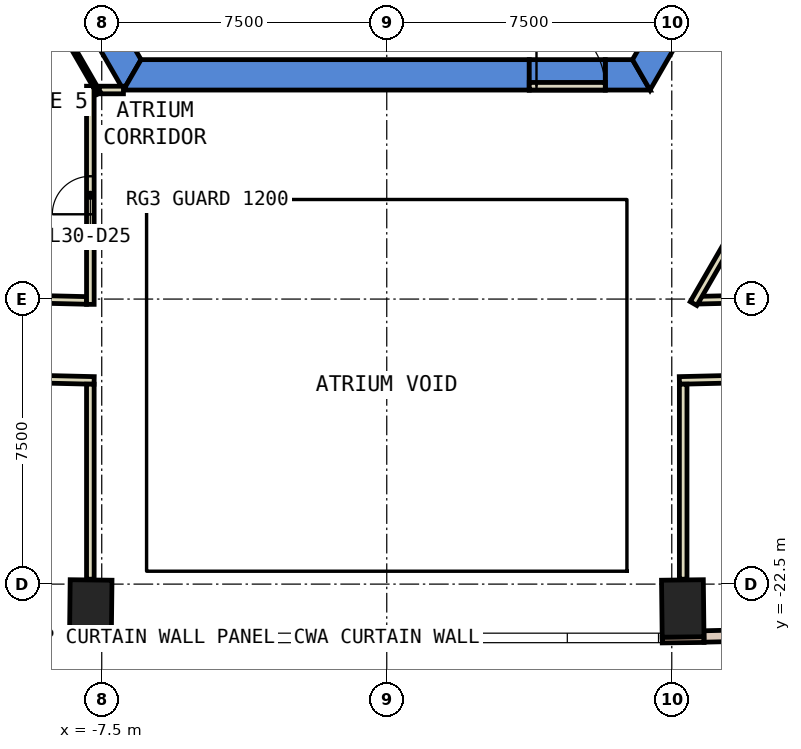
"""IFC4 building model, lengths in metres.
Left out: names, types, materials, properties, quantities, classifications, styles, units other than length and angle.
Written with IfcOpenShell. Run it as: python <this file> out.ifc"""

import sys

from ifc_helpers import new_model, si_unit, direction, frame, frame_2d, origin, origin_2d, place, context, subcontext, project, spatial, polyline, rectangle, outline, extrude, element, fill, save


model = new_model("IFC4")
c1 = context("Model", 3, precision=1e-05, world=origin(), true_north=direction((0.0, 1.0)))
c2 = subcontext(c1, "Body", "Model", "MODEL_VIEW")
j1 = project(units=[si_unit("LENGTHUNIT", "METRE"), si_unit("PLANEANGLEUNIT", "RADIAN")], contexts=[c1])
p1 = place(None, origin())
s1 = spatial("IfcSite", under=j1, at=p1, CompositionType="ELEMENT")
p2 = place(p1, origin())
s2 = spatial("IfcBuilding", under=s1, at=p2, CompositionType="ELEMENT")
p3 = place(p2, frame((0.0, 0.0, 138.2)))
s3 = spatial("IfcBuildingStorey", under=s2, at=p3, CompositionType="ELEMENT", Elevation=138.2)
for number, where, z_axis, x_axis in (
    (1, (-7.789, -23.141, 0.0), (0.0, 0.0, 1.0), (-1.0, 0.012, 0.0)),
    (2, (7.789, -23.141, 0.0), (0.0, 0.0, 1.0), (1.0, 0.012, 0.0)),
):
    element("IfcColumn", number, at=place(p3, frame(where, z_axis=z_axis, x_axis=x_axis)), inside=s3, PredefinedType="COLUMN", context=c2, shape_type="SweptSolid", body=[
        extrude(rectangle(XDim=1.1, YDim=1.5, at=origin_2d()), origin(), (0.0, 0.0, 1.0), 3.8),
    ])
p4 = place(p3, frame((0.0, 0.0, -0.6)))
e3 = element("IfcWall", 3, at=p4, inside=s3, PredefinedType="SHEAR", context=c2, shape_type="SweptSolid", body=[
    extrude(outline(polyline([(-13.856, 2.5), (-6.928, -9.5), (-6.466, -8.7), (-12.933, 2.5), (-13.856, 2.5)])), origin(), (0.0, 0.0, 1.0), 4.4),
])
p5 = place(p3, frame((0.0, 0.0, -0.6)))
e4 = element("IfcWall", 4, at=p5, inside=s3, PredefinedType="SHEAR", context=c2, shape_type="SweptSolid", body=[
    extrude(outline(polyline([(3.75, -9.5), (3.75, -8.7), (-6.466, -8.7), (-6.928, -9.5), (3.75, -9.5)])), origin(), (0.0, 0.0, 1.0), 4.4),
])
p6 = place(p3, frame((0.0, 0.0, -0.6)))
e5 = element("IfcWall", 5, at=p6, inside=s3, PredefinedType="SHEAR", context=c2, shape_type="SweptSolid", body=[
    extrude(outline(polyline([(5.75, -8.7), (5.75, -9.5), (6.928, -9.5), (6.466, -8.7), (5.75, -8.7)])), origin(), (0.0, 0.0, 1.0), 4.4),
])
p7 = place(p3, frame((0.0, 0.0, 3.6)))
e6 = element("IfcWall", 6, at=p7, inside=s3, PredefinedType="SHEAR", context=c2, shape_type="SweptSolid", body=[
    extrude(outline(polyline([(5.75, -9.5), (5.75, -8.7), (3.75, -8.7), (3.75, -9.5), (5.75, -9.5)])), origin(), (0.0, 0.0, 1.0), 0.2),
])
p8 = place(p3, frame((0.0, 0.0, -0.6)))
e7 = element("IfcWall", 7, at=p8, inside=s3, PredefinedType="SHEAR", context=c2, shape_type="SweptSolid", body=[
    extrude(outline(polyline([(8.117, -7.44), (7.424, -7.04), (6.466, -8.7), (6.928, -9.5), (8.117, -7.44)])), origin(), (0.0, 0.0, 1.0), 4.4),
])
for number, where, z_axis, x_axis in (
    (8, (-8.349, -23.96, 0.0), (0.0, 0.0, 1.0), (1.0, -0.011, 0.0)),
    (9, (7.249, -23.972, 0.0), (0.0, 0.0, 1.0), (1.0, 0.011, 0.0)),
):
    element("IfcWall", number, at=place(p3, frame(where, z_axis=z_axis, x_axis=x_axis)), inside=s3, PredefinedType="STANDARD", context=c2, shape_type="SweptSolid", body=[
        extrude(rectangle(XDim=1.1, YDim=0.15, at=frame_2d((0.55, 0.0))), origin(), (0.0, 0.0, 1.0), 3.8),
    ])
p9 = place(p3, frame((-15.68, -23.705, 0.0), z_axis=(0.0, 0.0, 1.0), x_axis=(0.999722302867, -0.023565168146, 0.0)))
e10 = element("IfcWall", 10, at=p9, inside=s3, PredefinedType="STANDARD", context=c2, shape_type="SweptSolid", body=[
    extrude(rectangle(XDim=7.335, YDim=0.3, at=frame_2d((3.667, 0.0))), origin(), (0.0, 0.0, 1.0), 3.8),
])
p10 = place(p9, frame((0.834, 0.0, 0.0)))
e11 = element("IfcOpeningElement", 11, at=p10, cuts=e10, PredefinedType="OPENING", context=c2, shape_type="SweptSolid", body=[
    extrude(rectangle(XDim=2.0, YDim=2.4, at=frame_2d((1.0, 1.2))), frame((0.0, 0.16, 0.0), z_axis=(0.0, -1.0, 0.0), x_axis=(1.0, 0.0, 0.0)), (0.0, 0.0, 1.0), 0.32),
])
p11 = place(p9, frame((4.301, 0.0, 0.9)))
e12 = element("IfcOpeningElement", 12, at=p11, cuts=e10, PredefinedType="OPENING", context=c2, shape_type="SweptSolid", body=[
    extrude(rectangle(XDim=2.4, YDim=2.6, at=frame_2d((1.2, 1.3))), frame((0.0, 0.16, 0.0), z_axis=(0.0, -1.0, 0.0), x_axis=(1.0, 0.0, 0.0)), (0.0, 0.0, 1.0), 0.32),
])
p12 = place(p3, frame((8.347, -23.878, 0.0), z_axis=(0.0, 0.0, 1.0), x_axis=(0.999722302867, 0.023565168146, 0.0)))
e13 = element("IfcWall", 13, at=p12, inside=s3, PredefinedType="STANDARD", context=c2, shape_type="SweptSolid", body=[
    extrude(rectangle(XDim=7.335, YDim=0.3, at=frame_2d((3.667, 0.0))), origin(), (0.0, 0.0, 1.0), 3.8),
])
p13 = place(p12, frame((0.634, 0.0, 0.9)))
e14 = element("IfcOpeningElement", 14, at=p13, cuts=e13, PredefinedType="OPENING", context=c2, shape_type="SweptSolid", body=[
    extrude(rectangle(XDim=2.4, YDim=2.6, at=frame_2d((1.2, 1.3))), frame((0.0, 0.16, 0.0), z_axis=(0.0, -1.0, 0.0), x_axis=(1.0, 0.0, 0.0)), (0.0, 0.0, 1.0), 0.32),
])
p14 = place(p12, frame((4.301, 0.0, 0.9)))
e15 = element("IfcOpeningElement", 15, at=p14, cuts=e13, PredefinedType="OPENING", context=c2, shape_type="SweptSolid", body=[
    extrude(rectangle(XDim=2.4, YDim=2.6, at=frame_2d((1.2, 1.3))), frame((0.0, 0.16, 0.0), z_axis=(0.0, -1.0, 0.0), x_axis=(1.0, 0.0, 0.0)), (0.0, 0.0, 1.0), 0.32),
])
p15 = place(p3, frame((8.223, -15.029, 0.0), z_axis=(0.0, 0.0, 1.0), x_axis=(0.99971920994, 0.023696018186, 0.0)))
e16 = element("IfcWall", 16, at=p15, inside=s3, PredefinedType="PARTITIONING", context=c2, shape_type="SweptSolid", body=[
    extrude(rectangle(XDim=7.727, YDim=0.2, at=frame_2d((3.864, 0.0))), origin(), (0.0, 0.0, 1.0), 3.8),
])
p16 = place(p3, frame((-10.155, -14.983, 0.0), z_axis=(0.0, 0.0, 1.0), x_axis=(0.999724165956, -0.023485995887, 0.0)))
e17 = element("IfcWall", 17, at=p16, inside=s3, PredefinedType="PARTITIONING", context=c2, shape_type="SweptSolid", body=[
    extrude(rectangle(XDim=2.256, YDim=0.2, at=frame_2d((1.128, 0.0))), origin(), (0.0, 0.0, 1.0), 3.8),
])
p17 = place(p3, frame((16.09, -16.943, 0.0), z_axis=(0.0, 0.0, 1.0), x_axis=(-0.999721662071, -0.023592337425, 0.0)))
e18 = element("IfcWall", 18, at=p17, inside=s3, PredefinedType="PARTITIONING", context=c2, shape_type="SweptSolid", body=[
    extrude(rectangle(XDim=8.393, YDim=0.2, at=frame_2d((4.196, 0.0))), origin(), (0.0, 0.0, 1.0), 3.8),
])
p18 = place(p17, frame((3.696, 0.0, 0.0)))
e19 = element("IfcOpeningElement", 19, at=p18, cuts=e18, PredefinedType="OPENING", context=c2, shape_type="SweptSolid", body=[
    extrude(rectangle(XDim=1.0, YDim=2.1, at=frame_2d((0.5, 1.05))), frame((0.0, 0.11, 0.0), z_axis=(0.0, -1.0, 0.0), x_axis=(1.0, 0.0, 0.0)), (0.0, 0.0, 1.0), 0.22),
])
p19 = place(p3, frame((-7.7, -17.141, 0.0), z_axis=(0.0, 0.0, 1.0), x_axis=(-0.999722699727, 0.023548325865, 0.0)))
e20 = element("IfcWall", 20, at=p19, inside=s3, PredefinedType="PARTITIONING", context=c2, shape_type="SweptSolid", body=[
    extrude(rectangle(XDim=8.242, YDim=0.2, at=frame_2d((4.121, 0.0))), origin(), (0.0, 0.0, 1.0), 3.8),
])
p20 = place(p19, frame((3.696, 0.0, 0.0)))
e21 = element("IfcOpeningElement", 21, at=p20, cuts=e20, PredefinedType="OPENING", context=c2, shape_type="SweptSolid", body=[
    extrude(rectangle(XDim=1.0, YDim=2.1, at=frame_2d((0.5, 1.05))), frame((0.0, 0.11, 0.0), z_axis=(0.0, -1.0, 0.0), x_axis=(1.0, 0.0, 0.0)), (0.0, 0.0, 1.0), 0.22),
])
p21 = place(p3, frame((-7.572, -9.499, 0.0), z_axis=(0.0, 0.0, 1.0), x_axis=(1.0, 0.0, 0.0)))
e22 = element("IfcWall", 22, at=p21, inside=s3, PredefinedType="PARTITIONING", context=c2, shape_type="SweptSolid", body=[
    extrude(rectangle(XDim=0.643, YDim=0.2, at=frame_2d((0.322, 0.0))), origin(), (0.0, 0.0, 1.0), 3.8),
])
p22 = place(p3, frame((-7.8, -15.139, 0.0), z_axis=(0.0, 0.0, 1.0), x_axis=(0.0, 1.0, 0.0)))
e23 = element("IfcWall", 23, at=p22, inside=s3, PredefinedType="PARTITIONING", context=c2, shape_type="SweptSolid", body=[
    extrude(rectangle(XDim=5.74, YDim=0.2, at=frame_2d((2.87, 0.0))), origin(), (0.0, 0.0, 1.0), 3.8),
])
p23 = place(p22, frame((2.37, 0.0, 0.0)))
e24 = element("IfcOpeningElement", 24, at=p23, cuts=e23, PredefinedType="OPENING", context=c2, shape_type="SweptSolid", body=[
    extrude(rectangle(XDim=1.0, YDim=2.1, at=frame_2d((0.5, 1.05))), frame((0.0, 0.11, 0.0), z_axis=(0.0, -1.0, 0.0), x_axis=(1.0, 0.0, 0.0)), (0.0, 0.0, 1.0), 0.22),
])
for number, where, z_axis, x_axis in (
    (25, (7.8, -17.239, 0.0), (0.0, 0.0, 1.0), (0.0, -1.0, 0.0)),
    (26, (-7.8, -22.371, 0.0), (0.0, 0.0, 1.0), (0.0, 1.0, 0.0)),
):
    element("IfcWall", number, at=place(p3, frame(where, z_axis=z_axis, x_axis=x_axis)), inside=s3, PredefinedType="PARTITIONING", context=c2, shape_type="SweptSolid", body=[
        extrude(rectangle(XDim=5.132, YDim=0.2, at=frame_2d((2.566, 0.0))), origin(), (0.0, 0.0, 1.0), 3.8),
    ])
p24 = place(p3, frame((-7.572, -9.586, 0.0), z_axis=(0.0, 0.0, 1.0), x_axis=(-0.500037407586, 0.866003805427, 0.0)))
e27 = element("IfcWall", 27, at=p24, inside=s3, PredefinedType="PARTITIONING", context=c2, shape_type="SweptSolid", body=[
    extrude(rectangle(XDim=4.115, YDim=0.1, at=frame_2d((2.058, 0.0))), origin(), (0.0, 0.0, 1.0), 3.8),
])
p25 = place(p3, frame((3.75, -9.4, 0.0), z_axis=(0.0, 0.0, 1.0), x_axis=(1.0, 0.0, 0.0)))
e28 = element("IfcWall", 28, at=p25, inside=s3, PredefinedType="PARTITIONING", context=c2, shape_type="SweptSolid", body=[
    extrude(rectangle(XDim=2.0, YDim=0.2, at=frame_2d((1.0, 0.0))), origin(), (0.0, 0.0, 1.0), 2.4),
])
p26 = place(p25, frame((0.19, 0.0, 0.0)))
e29 = element("IfcOpeningElement", 29, at=p26, cuts=e28, PredefinedType="OPENING", context=c2, shape_type="SweptSolid", body=[
    extrude(rectangle(XDim=1.8, YDim=2.1, at=frame_2d((0.9, 1.05))), frame((0.0, 0.11, 0.0), z_axis=(0.0, -1.0, 0.0), x_axis=(1.0, 0.0, 0.0)), (0.0, 0.0, 1.0), 0.22),
])
p27 = place(p3, frame((12.401, -7.621, 0.0), z_axis=(0.0, 0.0, 1.0), x_axis=(-0.499964151829, -0.866046099747, 0.0)))
e30 = element("IfcWall", 30, at=p27, inside=s3, PredefinedType="PARTITIONING", context=c2, shape_type="SweptSolid", body=[
    extrude(rectangle(XDim=8.656, YDim=0.2, at=frame_2d((4.328, 0.0))), origin(), (0.0, 0.0, 1.0), 3.8),
])
p28 = place(p27, frame((2.694, 0.0, 0.0)))
e31 = element("IfcOpeningElement", 31, at=p28, cuts=e30, PredefinedType="OPENING", context=c2, shape_type="SweptSolid", body=[
    extrude(rectangle(XDim=1.0, YDim=2.1, at=frame_2d((0.5, 1.05))), frame((0.0, 0.11, 0.0), z_axis=(0.0, -1.0, 0.0), x_axis=(1.0, 0.0, 0.0)), (0.0, 0.0, 1.0), 0.22),
])
p29 = place(p27, frame((3.794, 0.0, 0.0)))
e32 = element("IfcOpeningElement", 32, at=p29, cuts=e30, PredefinedType="OPENING", context=c2, shape_type="SweptSolid", body=[
    extrude(rectangle(XDim=1.0, YDim=2.1, at=frame_2d((0.5, 1.05))), frame((0.0, 0.11, 0.0), z_axis=(0.0, -1.0, 0.0), x_axis=(1.0, 0.0, 0.0)), (0.0, 0.0, 1.0), 0.22),
])
p30 = place(p23, origin())
e33 = element("IfcDoor", 33, at=p30, inside=s3, OperationType="SINGLE_SWING_LEFT", PredefinedType="DOOR", context=c2, shape_type="SweptSolid", body=[
    extrude(rectangle(XDim=1.0, YDim=2.1, at=frame_2d((0.5, 1.05))), frame((0.0, 0.025, 0.0), z_axis=(0.0, -1.0, 0.0), x_axis=(1.0, 0.0, 0.0)), (0.0, 0.0, 1.0), 0.05),
])
fill(e24, e33)
p31 = place(p26, origin())
e34 = element("IfcDoor", 34, at=p31, inside=s3, OperationType="DOUBLE_DOOR_SINGLE_SWING", PredefinedType="DOOR", context=c2, shape_type="SweptSolid", body=[
    extrude(rectangle(XDim=1.8, YDim=2.1, at=frame_2d((0.9, 1.05))), frame((0.0, 0.025, 0.0), z_axis=(0.0, -1.0, 0.0), x_axis=(1.0, 0.0, 0.0)), (0.0, 0.0, 1.0), 0.05),
])
fill(e29, e34)
save(model, sys.argv[1])
